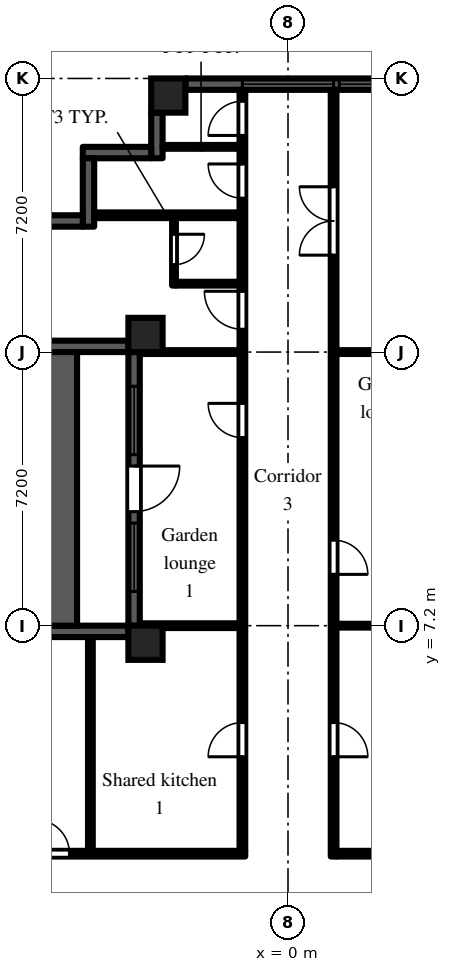
"""IFC4 building model, lengths in metres.
Left out: names, types, materials, properties, quantities, classifications, styles, units other than length and angle.
Written with IfcOpenShell. Run it as: python <this file> out.ifc"""

import sys

from ifc_helpers import new_model, si_unit, direction, frame, frame_2d, origin, origin_2d, place, context, subcontext, project, spatial, rectangle, extrude, element, fill, save


model = new_model("IFC4")
c1 = context("Model", 3, precision=1e-05, world=origin(), true_north=direction((0.0, 1.0)))
c2 = subcontext(c1, "Body", "Model", "MODEL_VIEW")
j1 = project(units=[si_unit("LENGTHUNIT", "METRE"), si_unit("PLANEANGLEUNIT", "RADIAN")], contexts=[c1])
p1 = place(None, origin())
s1 = spatial("IfcSite", under=j1, at=p1, CompositionType="ELEMENT")
p2 = place(p1, origin())
s2 = spatial("IfcBuilding", under=s1, at=p2, CompositionType="ELEMENT")
p3 = place(p2, frame((0.0, 0.0, 75.9)))
s3 = spatial("IfcBuildingStorey", under=s2, at=p3, CompositionType="ELEMENT", Elevation=75.9)
for number, where, z_axis, x_axis in (
    (1, (-3.75, 6.75, 0.0), (0.0, 0.0, 1.0), (1.0, 0.0, 0.0)),
    (2, (-3.75, 14.85, 0.0), (0.0, 0.0, 1.0), (1.0, 0.0, 0.0)),
    (3, (-3.15, 21.15, 0.0), (0.0, 0.0, 1.0), (1.0, 0.0, 0.0)),
):
    element("IfcColumn", number, at=place(p3, frame(where, z_axis=z_axis, x_axis=x_axis)), inside=s3, PredefinedType="COLUMN", context=c2, shape_type="SweptSolid", body=[
        extrude(rectangle(XDim=0.9, YDim=0.9, at=origin_2d()), origin(), (0.0, 0.0, 1.0), 3.0),
    ])
p4 = place(p3, frame((2.7, 21.45, 0.0), z_axis=(0.0, 0.0, 1.0), x_axis=(-1.0, 0.0, 0.0)))
e4 = element("IfcWall", 4, at=p4, inside=s3, PredefinedType="SOLIDWALL", context=c2, shape_type="SweptSolid", body=[
    extrude(rectangle(XDim=5.4, YDim=0.3, at=frame_2d((2.7, 0.0))), origin(), (0.0, 0.0, 1.0), 2.1),
])
p5 = place(p4, frame((1.5, 0.0, 0.2)))
e5 = element("IfcOpeningElement", 5, at=p5, cuts=e4, PredefinedType="OPENING", context=c2, shape_type="SweptSolid", body=[
    extrude(rectangle(XDim=2.4, YDim=1.85, at=frame_2d((1.2, 0.925))), frame((0.0, 0.16, 0.0), z_axis=(0.0, -1.0, 0.0), x_axis=(1.0, 0.0, 0.0)), (0.0, 0.0, 1.0), 0.32),
])
p6 = place(p4, frame((0.15, 0.0, 0.2)))
e6 = element("IfcOpeningElement", 6, at=p6, cuts=e4, PredefinedType="OPENING", context=c2, shape_type="SweptSolid", body=[
    extrude(rectangle(XDim=1.2, YDim=1.85, at=frame_2d((0.6, 0.925))), frame((0.0, 0.16, 0.0), z_axis=(0.0, -1.0, 0.0), x_axis=(1.0, 0.0, 0.0)), (0.0, 0.0, 1.0), 0.32),
])
p7 = place(p3, frame((-3.45, 20.7, 0.0), z_axis=(0.0, 0.0, 1.0), x_axis=(0.0, -1.0, 0.0)))
e7 = element("IfcWall", 7, at=p7, inside=s3, PredefinedType="SOLIDWALL", context=c2, shape_type="SweptSolid", body=[
    extrude(rectangle(XDim=1.2, YDim=0.3, at=frame_2d((0.6, 0.0))), origin(), (0.0, 0.0, 1.0), 2.575),
])
p8 = place(p3, frame((-3.6, 19.65, 0.0), z_axis=(0.0, 0.0, 1.0), x_axis=(-1.0, 0.0, 0.0)))
e8 = element("IfcWall", 8, at=p8, inside=s3, PredefinedType="SOLIDWALL", context=c2, shape_type="SweptSolid", body=[
    extrude(rectangle(XDim=1.8, YDim=0.3, at=frame_2d((0.9, 0.0))), origin(), (0.0, 0.0, 1.0), 2.575),
])
p9 = place(p3, frame((-5.25, 19.5, 0.0), z_axis=(0.0, 0.0, 1.0), x_axis=(0.0, -1.0, 0.0)))
e9 = element("IfcWall", 9, at=p9, inside=s3, PredefinedType="SOLIDWALL", context=c2, shape_type="SweptSolid", body=[
    extrude(rectangle(XDim=1.8, YDim=0.3, at=frame_2d((0.9, 0.0))), origin(), (0.0, 0.0, 1.0), 2.575),
])
p10 = place(p3, frame((-5.4, 17.85, 0.0), z_axis=(0.0, 0.0, 1.0), x_axis=(-1.0, 0.0, 0.0)))
e10 = element("IfcWall", 10, at=p10, inside=s3, PredefinedType="SOLIDWALL", context=c2, shape_type="SweptSolid", body=[
    extrude(rectangle(XDim=0.9, YDim=0.3, at=frame_2d((0.45, 0.0))), origin(), (0.0, 0.0, 1.0), 2.575),
])
p11 = place(p3, frame((-6.3, 14.55, 0.0), z_axis=(0.0, 0.0, 1.0), x_axis=(1.0, 0.0, 0.0)))
e11 = element("IfcWall", 11, at=p11, inside=s3, PredefinedType="SOLIDWALL", context=c2, shape_type="SweptSolid", body=[
    extrude(rectangle(XDim=2.1, YDim=0.3, at=frame_2d((1.05, 0.0))), origin(), (0.0, 0.0, 1.0), 2.1),
])
p12 = place(p3, frame((-4.05, 14.4, 0.0), z_axis=(0.0, 0.0, 1.0), x_axis=(0.0, -1.0, 0.0)))
e12 = element("IfcWall", 12, at=p12, inside=s3, PredefinedType="SOLIDWALL", context=c2, shape_type="SweptSolid", body=[
    extrude(rectangle(XDim=7.2, YDim=0.3, at=frame_2d((3.6, 0.0))), origin(), (0.0, 0.0, 1.0), 2.1),
])
p13 = place(p12, frame((3.0, 0.0, 0.0)))
e13 = element("IfcOpeningElement", 13, at=p13, cuts=e12, PredefinedType="OPENING", context=c2, shape_type="SweptSolid", body=[
    extrude(rectangle(XDim=1.2, YDim=2.05, at=frame_2d((0.6, 1.025))), frame((0.0, 0.16, 0.0), z_axis=(0.0, -1.0, 0.0), x_axis=(1.0, 0.0, 0.0)), (0.0, 0.0, 1.0), 0.32),
])
p14 = place(p12, frame((0.9, 0.0, 0.2)))
e14 = element("IfcOpeningElement", 14, at=p14, cuts=e12, PredefinedType="OPENING", context=c2, shape_type="SweptSolid", body=[
    extrude(rectangle(XDim=1.8, YDim=1.85, at=frame_2d((0.9, 0.925))), frame((0.0, 0.16, 0.0), z_axis=(0.0, -1.0, 0.0), x_axis=(1.0, 0.0, 0.0)), (0.0, 0.0, 1.0), 0.32),
])
p15 = place(p12, frame((4.5, 0.0, 0.2)))
e15 = element("IfcOpeningElement", 15, at=p15, cuts=e12, PredefinedType="OPENING", context=c2, shape_type="SweptSolid", body=[
    extrude(rectangle(XDim=1.8, YDim=1.85, at=frame_2d((0.9, 0.925))), frame((0.0, 0.16, 0.0), z_axis=(0.0, -1.0, 0.0), x_axis=(1.0, 0.0, 0.0)), (0.0, 0.0, 1.0), 0.32),
])
p16 = place(p3, frame((-4.2, 7.05, 0.0), z_axis=(0.0, 0.0, 1.0), x_axis=(-1.0, 0.0, 0.0)))
e16 = element("IfcWall", 16, at=p16, inside=s3, PredefinedType="SOLIDWALL", context=c2, shape_type="SweptSolid", body=[
    extrude(rectangle(XDim=3.0, YDim=0.3, at=frame_2d((1.5, 0.0))), origin(), (0.0, 0.0, 1.0), 2.1),
])
p17 = place(p3, frame((-6.0, 7.2, 0.0), z_axis=(0.0, 0.0, 1.0), x_axis=(0.0, 1.0, 0.0)))
e17 = element("IfcWall", 17, at=p17, inside=s3, PredefinedType="PARAPET", context=c2, shape_type="SweptSolid", body=[
    extrude(rectangle(XDim=7.2, YDim=0.9, at=frame_2d((3.6, 0.0))), origin(), (0.0, 0.0, 1.0), 0.8),
])
p18 = place(p3, frame((-7.2, 1.2, 0.0), z_axis=(0.0, 0.0, 1.0), x_axis=(1.0, 0.0, 0.0)))
e18 = element("IfcWall", 18, at=p18, inside=s3, PredefinedType="PARTITIONING", context=c2, shape_type="SweptSolid", body=[
    extrude(rectangle(XDim=6.075, YDim=0.15, at=frame_2d((3.038, 0.0))), origin(), (0.0, 0.0, 1.0), 2.575),
])
p19 = place(p18, frame((0.55, 0.0, 0.0)))
e19 = element("IfcOpeningElement", 19, at=p19, cuts=e18, PredefinedType="OPENING", context=c2, shape_type="SweptSolid", body=[
    extrude(rectangle(XDim=0.9, YDim=2.1, at=frame_2d((0.45, 1.05))), frame((0.0, 0.085, 0.0), z_axis=(0.0, -1.0, 0.0), x_axis=(1.0, 0.0, 0.0)), (0.0, 0.0, 1.0), 0.17),
])
p20 = place(p3, frame((-5.2, 1.275, 0.0), z_axis=(0.0, 0.0, 1.0), x_axis=(0.0, 1.0, 0.0)))
e20 = element("IfcWall", 20, at=p20, inside=s3, PredefinedType="PARTITIONING", context=c2, shape_type="SweptSolid", body=[
    extrude(rectangle(XDim=5.625, YDim=0.125, at=frame_2d((2.812, 0.0))), origin(), (0.0, 0.0, 1.0), 2.575),
])
p21 = place(p3, frame((-5.1, 18.0, 0.0), z_axis=(0.0, 0.0, 1.0), x_axis=(1.0, 0.0, 0.0)))
e21 = element("IfcWall", 21, at=p21, inside=s3, PredefinedType="PARTITIONING", context=c2, shape_type="SweptSolid", body=[
    extrude(rectangle(XDim=3.825, YDim=0.15, at=frame_2d((1.913, 0.0))), origin(), (0.0, 0.0, 1.0), 2.575),
])
p22 = place(p3, frame((-3.9, 7.2, 0.0), z_axis=(0.0, 0.0, 1.0), x_axis=(1.0, 0.0, 0.0)))
e22 = element("IfcWall", 22, at=p22, inside=s3, PredefinedType="PARTITIONING", context=c2, shape_type="SweptSolid", body=[
    extrude(rectangle(XDim=2.625, YDim=0.125, at=frame_2d((1.312, 0.0))), origin(), (0.0, 0.0, 1.0), 2.575),
])
p23 = place(p3, frame((-3.9, 14.4, 0.0), z_axis=(0.0, 0.0, 1.0), x_axis=(1.0, 0.0, 0.0)))
e23 = element("IfcWall", 23, at=p23, inside=s3, PredefinedType="PARTITIONING", context=c2, shape_type="SweptSolid", body=[
    extrude(rectangle(XDim=2.625, YDim=0.1, at=frame_2d((1.312, 0.0))), origin(), (0.0, 0.0, 1.0), 2.575),
])
p24 = place(p3, frame((-3.3, 19.8, 0.0), z_axis=(0.0, 0.0, 1.0), x_axis=(1.0, 0.0, 0.0)))
e24 = element("IfcWall", 24, at=p24, inside=s3, PredefinedType="PARTITIONING", context=c2, shape_type="SweptSolid", body=[
    extrude(rectangle(XDim=2.025, YDim=0.1, at=frame_2d((1.013, 0.0))), origin(), (0.0, 0.0, 1.0), 2.575),
])
p25 = place(p3, frame((-3.0, 16.15, 0.0), z_axis=(0.0, 0.0, 1.0), x_axis=(0.0, 1.0, 0.0)))
e25 = element("IfcWall", 25, at=p25, inside=s3, PredefinedType="PARTITIONING", context=c2, shape_type="SweptSolid", body=[
    extrude(rectangle(XDim=1.775, YDim=0.1, at=frame_2d((0.888, 0.0))), origin(), (0.0, 0.0, 1.0), 2.575),
])
p26 = place(p25, frame((0.55, 0.0, 0.0)))
e26 = element("IfcOpeningElement", 26, at=p26, cuts=e25, PredefinedType="OPENING", context=c2, shape_type="SweptSolid", body=[
    extrude(rectangle(XDim=0.8, YDim=2.1, at=frame_2d((0.4, 1.05))), frame((0.0, 0.06, 0.0), z_axis=(0.0, -1.0, 0.0), x_axis=(1.0, 0.0, 0.0)), (0.0, 0.0, 1.0), 0.12),
])
p27 = place(p3, frame((-2.95, 16.2, 0.0), z_axis=(0.0, 0.0, 1.0), x_axis=(1.0, 0.0, 0.0)))
e27 = element("IfcWall", 27, at=p27, inside=s3, PredefinedType="PARTITIONING", context=c2, shape_type="SweptSolid", body=[
    extrude(rectangle(XDim=1.675, YDim=0.1, at=frame_2d((0.837, 0.0))), origin(), (0.0, 0.0, 1.0), 2.575),
])
p28 = place(p3, frame((-1.2, 1.275, 0.0), z_axis=(0.0, 0.0, 1.0), x_axis=(0.0, 1.0, 0.0)))
e28 = element("IfcWall", 28, at=p28, inside=s3, PredefinedType="PARTITIONING", context=c2, shape_type="SweptSolid", body=[
    extrude(rectangle(XDim=20.025, YDim=0.15, at=frame_2d((10.013, 0.0))), origin(), (0.0, 0.0, 1.0), 2.575),
])
p29 = place(p28, frame((2.475, 0.0, 0.0)))
e29 = element("IfcOpeningElement", 29, at=p29, cuts=e28, PredefinedType="OPENING", context=c2, shape_type="SweptSolid", body=[
    extrude(rectangle(XDim=0.9, YDim=2.1, at=frame_2d((0.45, 1.05))), frame((0.0, 0.085, 0.0), z_axis=(0.0, -1.0, 0.0), x_axis=(1.0, 0.0, 0.0)), (0.0, 0.0, 1.0), 0.17),
])
p30 = place(p28, frame((10.875, 0.0, 0.0)))
e30 = element("IfcOpeningElement", 30, at=p30, cuts=e28, PredefinedType="OPENING", context=c2, shape_type="SweptSolid", body=[
    extrude(rectangle(XDim=0.9, YDim=2.1, at=frame_2d((0.45, 1.05))), frame((0.0, 0.085, 0.0), z_axis=(0.0, -1.0, 0.0), x_axis=(1.0, 0.0, 0.0)), (0.0, 0.0, 1.0), 0.17),
])
p31 = place(p28, frame((13.725, 0.0, 0.0)))
e31 = element("IfcOpeningElement", 31, at=p31, cuts=e28, PredefinedType="OPENING", context=c2, shape_type="SweptSolid", body=[
    extrude(rectangle(XDim=1.0, YDim=2.1, at=frame_2d((0.5, 1.05))), frame((0.0, 0.085, 0.0), z_axis=(0.0, -1.0, 0.0), x_axis=(1.0, 0.0, 0.0)), (0.0, 0.0, 1.0), 0.17),
])
p32 = place(p28, frame((17.175, 0.0, 0.0)))
e32 = element("IfcOpeningElement", 32, at=p32, cuts=e28, PredefinedType="OPENING", context=c2, shape_type="SweptSolid", body=[
    extrude(rectangle(XDim=0.9, YDim=2.1, at=frame_2d((0.45, 1.05))), frame((0.0, 0.085, 0.0), z_axis=(0.0, -1.0, 0.0), x_axis=(1.0, 0.0, 0.0)), (0.0, 0.0, 1.0), 0.17),
])
p33 = place(p28, frame((18.825, 0.0, 0.0)))
e33 = element("IfcOpeningElement", 33, at=p33, cuts=e28, PredefinedType="OPENING", context=c2, shape_type="SweptSolid", body=[
    extrude(rectangle(XDim=0.9, YDim=2.1, at=frame_2d((0.45, 1.05))), frame((0.0, 0.085, 0.0), z_axis=(0.0, -1.0, 0.0), x_axis=(1.0, 0.0, 0.0)), (0.0, 0.0, 1.0), 0.17),
])
p34 = place(p3, frame((1.2, 1.125, 0.0), z_axis=(0.0, 0.0, 1.0), x_axis=(0.0, 1.0, 0.0)))
e34 = element("IfcWall", 34, at=p34, inside=s3, PredefinedType="PARTITIONING", context=c2, shape_type="SweptSolid", body=[
    extrude(rectangle(XDim=20.175, YDim=0.15, at=frame_2d((10.087, 0.0))), origin(), (0.0, 0.0, 1.0), 2.575),
])
p35 = place(p34, frame((2.625, 0.0, 0.0)))
e35 = element("IfcOpeningElement", 35, at=p35, cuts=e34, PredefinedType="OPENING", context=c2, shape_type="SweptSolid", body=[
    extrude(rectangle(XDim=0.9, YDim=2.1, at=frame_2d((0.45, 1.05))), frame((0.0, 0.085, 0.0), z_axis=(0.0, -1.0, 0.0), x_axis=(1.0, 0.0, 0.0)), (0.0, 0.0, 1.0), 0.17),
])
p36 = place(p34, frame((7.425, 0.0, 0.0)))
e36 = element("IfcOpeningElement", 36, at=p36, cuts=e34, PredefinedType="OPENING", context=c2, shape_type="SweptSolid", body=[
    extrude(rectangle(XDim=0.9, YDim=2.1, at=frame_2d((0.45, 1.05))), frame((0.0, 0.085, 0.0), z_axis=(0.0, -1.0, 0.0), x_axis=(1.0, 0.0, 0.0)), (0.0, 0.0, 1.0), 0.17),
])
p37 = place(p34, frame((15.825, 0.0, 0.0)))
e37 = element("IfcOpeningElement", 37, at=p37, cuts=e34, PredefinedType="OPENING", context=c2, shape_type="SweptSolid", body=[
    extrude(rectangle(XDim=1.8, YDim=2.1, at=frame_2d((0.9, 1.05))), frame((0.0, 0.085, 0.0), z_axis=(0.0, -1.0, 0.0), x_axis=(1.0, 0.0, 0.0)), (0.0, 0.0, 1.0), 0.17),
])
p38 = place(p3, frame((1.275, 1.2, 0.0), z_axis=(0.0, 0.0, 1.0), x_axis=(1.0, 0.0, 0.0)))
e38 = element("IfcWall", 38, at=p38, inside=s3, PredefinedType="PARTITIONING", context=c2, shape_type="SweptSolid", body=[
    extrude(rectangle(XDim=5.925, YDim=0.15, at=frame_2d((2.962, 0.0))), origin(), (0.0, 0.0, 1.0), 2.575),
])
p39 = place(p38, frame((3.475, 0.0, 0.0)))
e39 = element("IfcOpeningElement", 39, at=p39, cuts=e38, PredefinedType="OPENING", context=c2, shape_type="SweptSolid", body=[
    extrude(rectangle(XDim=0.9, YDim=2.1, at=frame_2d((0.45, 1.05))), frame((0.0, 0.085, 0.0), z_axis=(0.0, -1.0, 0.0), x_axis=(1.0, 0.0, 0.0)), (0.0, 0.0, 1.0), 0.17),
])
for number, where, z_axis, x_axis in (
    (40, (1.275, 7.2, 0.0), (0.0, 0.0, 1.0), (1.0, 0.0, 0.0)),
    (41, (1.275, 14.4, 0.0), (0.0, 0.0, 1.0), (1.0, 0.0, 0.0)),
):
    element("IfcWall", number, at=place(p3, frame(where, z_axis=z_axis, x_axis=x_axis)), inside=s3, PredefinedType="PARTITIONING", context=c2, shape_type="SweptSolid", body=[
        extrude(rectangle(XDim=2.625, YDim=0.1, at=frame_2d((1.312, 0.0))), origin(), (0.0, 0.0, 1.0), 2.575),
    ])
p40 = place(p5, origin())
e42 = element("IfcWindow", 42, at=p40, inside=s3, PartitioningType="SINGLE_PANEL", PredefinedType="WINDOW", context=c2, shape_type="SweptSolid", body=[
    extrude(rectangle(XDim=2.4, YDim=1.85, at=frame_2d((1.2, 0.925))), frame((0.0, 0.03, 0.0), z_axis=(0.0, -1.0, 0.0), x_axis=(1.0, 0.0, 0.0)), (0.0, 0.0, 1.0), 0.06),
])
fill(e5, e42)
p41 = place(p6, origin())
e43 = element("IfcWindow", 43, at=p41, inside=s3, PartitioningType="SINGLE_PANEL", PredefinedType="WINDOW", context=c2, shape_type="SweptSolid", body=[
    extrude(rectangle(XDim=1.2, YDim=1.85, at=frame_2d((0.6, 0.925))), frame((0.0, 0.03, 0.0), z_axis=(0.0, -1.0, 0.0), x_axis=(1.0, 0.0, 0.0)), (0.0, 0.0, 1.0), 0.06),
])
fill(e6, e43)
p42 = place(p13, origin())
e44 = element("IfcDoor", 44, at=p42, inside=s3, OperationType="SINGLE_SWING_LEFT", PredefinedType="DOOR", context=c2, shape_type="SweptSolid", body=[
    extrude(rectangle(XDim=1.2, YDim=2.05, at=frame_2d((0.6, 1.025))), frame((0.0, 0.025, 0.0), z_axis=(0.0, -1.0, 0.0), x_axis=(1.0, 0.0, 0.0)), (0.0, 0.0, 1.0), 0.05),
])
fill(e13, e44)
p43 = place(p14, origin())
e45 = element("IfcWindow", 45, at=p43, inside=s3, PartitioningType="SINGLE_PANEL", PredefinedType="WINDOW", context=c2, shape_type="SweptSolid", body=[
    extrude(rectangle(XDim=1.8, YDim=1.85, at=frame_2d((0.9, 0.925))), frame((0.0, 0.03, 0.0), z_axis=(0.0, -1.0, 0.0), x_axis=(1.0, 0.0, 0.0)), (0.0, 0.0, 1.0), 0.06),
])
fill(e14, e45)
p44 = place(p15, origin())
e46 = element("IfcWindow", 46, at=p44, inside=s3, PartitioningType="SINGLE_PANEL", PredefinedType="WINDOW", context=c2, shape_type="SweptSolid", body=[
    extrude(rectangle(XDim=1.8, YDim=1.85, at=frame_2d((0.9, 0.925))), frame((0.0, 0.03, 0.0), z_axis=(0.0, -1.0, 0.0), x_axis=(1.0, 0.0, 0.0)), (0.0, 0.0, 1.0), 0.06),
])
fill(e15, e46)
p45 = place(p35, frame((0.9, 0.0, 0.0), z_axis=(0.0, 0.0, 1.0), x_axis=(-1.0, 0.0, 0.0)))
e47 = element("IfcDoor", 47, at=p45, inside=s3, OperationType="SINGLE_SWING_RIGHT", PredefinedType="DOOR", context=c2, shape_type="SweptSolid", body=[
    extrude(rectangle(XDim=0.9, YDim=2.1, at=frame_2d((0.45, 1.05))), frame((0.0, 0.025, 0.0), z_axis=(0.0, -1.0, 0.0), x_axis=(1.0, 0.0, 0.0)), (0.0, 0.0, 1.0), 0.05),
])
fill(e35, e47)
p46 = place(p29, origin())
e48 = element("IfcDoor", 48, at=p46, inside=s3, OperationType="SINGLE_SWING_LEFT", PredefinedType="DOOR", context=c2, shape_type="SweptSolid", body=[
    extrude(rectangle(XDim=0.9, YDim=2.1, at=frame_2d((0.45, 1.05))), frame((0.0, 0.025, 0.0), z_axis=(0.0, -1.0, 0.0), x_axis=(1.0, 0.0, 0.0)), (0.0, 0.0, 1.0), 0.05),
])
fill(e29, e48)
p47 = place(p19, origin())
e49 = element("IfcDoor", 49, at=p47, inside=s3, OperationType="SINGLE_SWING_LEFT", PredefinedType="DOOR", context=c2, shape_type="SweptSolid", body=[
    extrude(rectangle(XDim=0.9, YDim=2.1, at=frame_2d((0.45, 1.05))), frame((0.0, 0.025, 0.0), z_axis=(0.0, -1.0, 0.0), x_axis=(1.0, 0.0, 0.0)), (0.0, 0.0, 1.0), 0.05),
])
fill(e19, e49)
p48 = place(p30, origin())
e50 = element("IfcDoor", 50, at=p48, inside=s3, OperationType="SINGLE_SWING_RIGHT", PredefinedType="DOOR", context=c2, shape_type="SweptSolid", body=[
    extrude(rectangle(XDim=0.9, YDim=2.1, at=frame_2d((0.45, 1.05))), frame((0.0, 0.025, 0.0), z_axis=(0.0, -1.0, 0.0), x_axis=(1.0, 0.0, 0.0)), (0.0, 0.0, 1.0), 0.05),
])
fill(e30, e50)
p49 = place(p26, frame((0.8, 0.0, 0.0), z_axis=(0.0, 0.0, 1.0), x_axis=(-1.0, 0.0, 0.0)))
e51 = element("IfcDoor", 51, at=p49, inside=s3, OperationType="SINGLE_SWING_LEFT", PredefinedType="DOOR", context=c2, shape_type="SweptSolid", body=[
    extrude(rectangle(XDim=0.8, YDim=2.1, at=frame_2d((0.4, 1.05))), frame((0.0, 0.025, 0.0), z_axis=(0.0, -1.0, 0.0), x_axis=(1.0, 0.0, 0.0)), (0.0, 0.0, 1.0), 0.05),
])
fill(e26, e51)
p50 = place(p31, origin())
e52 = element("IfcDoor", 52, at=p50, inside=s3, OperationType="SINGLE_SWING_RIGHT", PredefinedType="DOOR", context=c2, shape_type="SweptSolid", body=[
    extrude(rectangle(XDim=1.0, YDim=2.1, at=frame_2d((0.5, 1.05))), frame((0.0, 0.025, 0.0), z_axis=(0.0, -1.0, 0.0), x_axis=(1.0, 0.0, 0.0)), (0.0, 0.0, 1.0), 0.05),
])
fill(e31, e52)
p51 = place(p32, origin())
e53 = element("IfcDoor", 53, at=p51, inside=s3, OperationType="SINGLE_SWING_RIGHT", PredefinedType="DOOR", context=c2, shape_type="SweptSolid", body=[
    extrude(rectangle(XDim=0.9, YDim=2.1, at=frame_2d((0.45, 1.05))), frame((0.0, 0.025, 0.0), z_axis=(0.0, -1.0, 0.0), x_axis=(1.0, 0.0, 0.0)), (0.0, 0.0, 1.0), 0.05),
])
fill(e32, e53)
p52 = place(p33, origin())
e54 = element("IfcDoor", 54, at=p52, inside=s3, OperationType="SINGLE_SWING_LEFT", PredefinedType="DOOR", context=c2, shape_type="SweptSolid", body=[
    extrude(rectangle(XDim=0.9, YDim=2.1, at=frame_2d((0.45, 1.05))), frame((0.0, 0.025, 0.0), z_axis=(0.0, -1.0, 0.0), x_axis=(1.0, 0.0, 0.0)), (0.0, 0.0, 1.0), 0.05),
])
fill(e33, e54)
p53 = place(p36, frame((0.9, 0.0, 0.0), z_axis=(0.0, 0.0, 1.0), x_axis=(-1.0, 0.0, 0.0)))
e55 = element("IfcDoor", 55, at=p53, inside=s3, OperationType="SINGLE_SWING_RIGHT", PredefinedType="DOOR", context=c2, shape_type="SweptSolid", body=[
    extrude(rectangle(XDim=0.9, YDim=2.1, at=frame_2d((0.45, 1.05))), frame((0.0, 0.025, 0.0), z_axis=(0.0, -1.0, 0.0), x_axis=(1.0, 0.0, 0.0)), (0.0, 0.0, 1.0), 0.05),
])
fill(e36, e55)
p54 = place(p37, origin())
e56 = element("IfcDoor", 56, at=p54, inside=s3, OperationType="DOUBLE_DOOR_DOUBLE_SWING", PredefinedType="DOOR", context=c2, shape_type="SweptSolid", body=[
    extrude(rectangle(XDim=1.8, YDim=2.1, at=frame_2d((0.9, 1.05))), frame((0.0, 0.025, 0.0), z_axis=(0.0, -1.0, 0.0), x_axis=(1.0, 0.0, 0.0)), (0.0, 0.0, 1.0), 0.05),
])
fill(e37, e56)
save(model, sys.argv[1])
